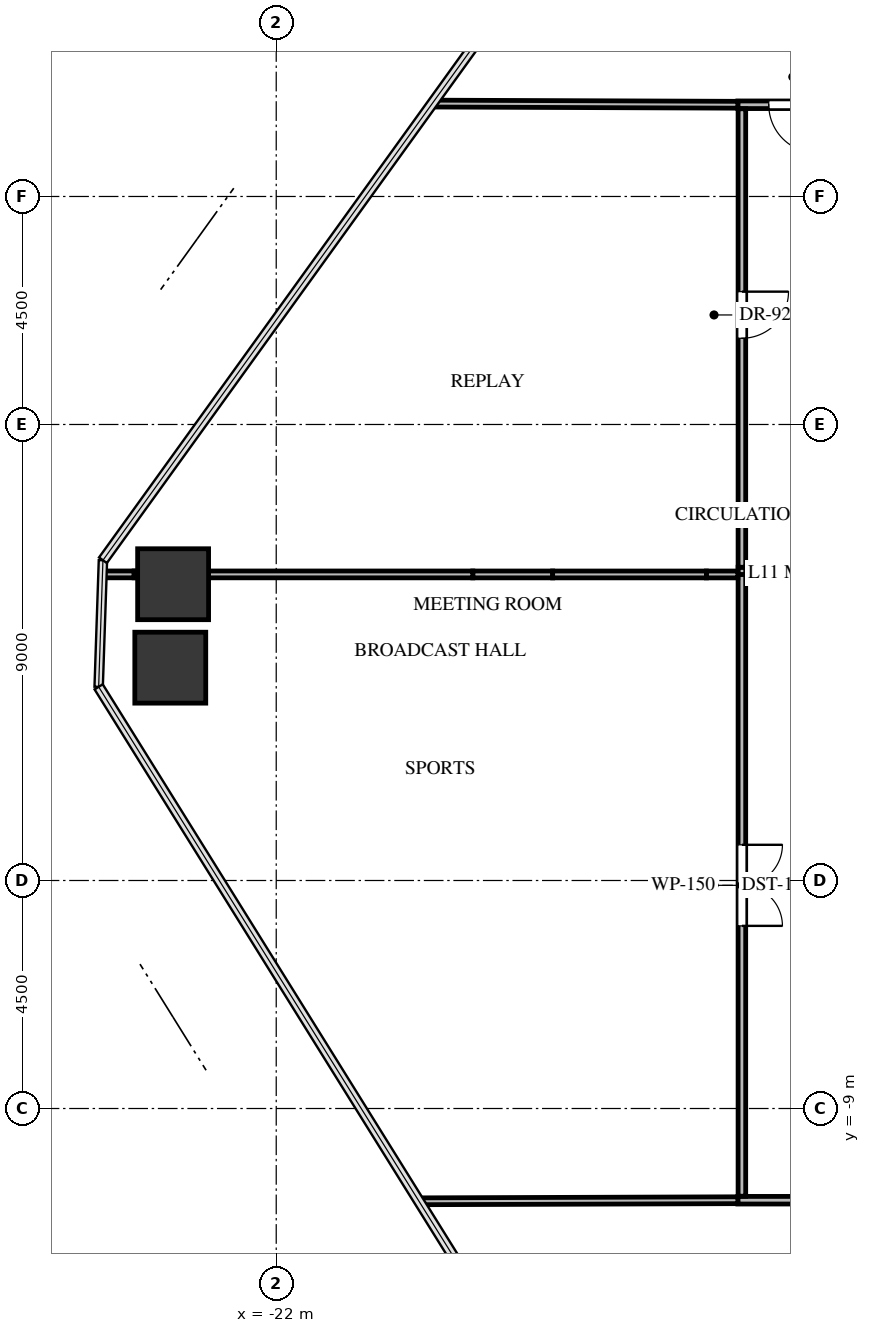
"""IFC4 building model, lengths in metres.
Left out: names, types, materials, properties, quantities, classifications, styles, units other than length and angle.
Written with IfcOpenShell. Run it as: python <this file> out.ifc"""

import sys

from ifc_helpers import new_model, si_unit, direction, frame, frame_2d, origin, origin_2d, place, context, subcontext, project, spatial, rectangle, extrude, source, transform, mapped, element, fill, save


model = new_model("IFC4")
c1 = context("Model", 3, precision=1e-05, world=origin(), true_north=direction((0.0, 1.0)))
c2 = subcontext(c1, "Body", "Model", "MODEL_VIEW")
j1 = project(units=[si_unit("LENGTHUNIT", "METRE"), si_unit("PLANEANGLEUNIT", "RADIAN")], contexts=[c1])
p1 = place(None, origin())
s1 = spatial("IfcSite", under=j1, at=p1, CompositionType="ELEMENT")
p2 = place(p1, origin())
s2 = spatial("IfcBuilding", under=s1, at=p2, CompositionType="ELEMENT")
p3 = place(p2, frame((0.0, 0.0, 48.9)))
s3 = spatial("IfcBuildingStorey", under=s2, at=p3, CompositionType="ELEMENT", Elevation=48.9)
m1 = source(origin(), c2, "Body", "SweptSolid", [
    extrude(rectangle(XDim=1.4, YDim=1.4, at=origin_2d()), origin(), (0.0, 0.0, 1.0), 3.3),
])
for number, where, z_axis, x_axis in (
    (1, (-24.091, -0.3, -0.24), (0.0, 0.0, 1.0), (1.0, 0.0, 0.0)),
    (2, (-24.035, 1.347, -0.24), (0.0, 0.0, 1.0), (1.0, 0.0, 0.0)),
):
    element("IfcColumn", number, at=place(p3, frame(where, z_axis=z_axis, x_axis=x_axis)), inside=s3, PredefinedType="COLUMN", context=c2, shape_type="MappedRepresentation", body=[
        mapped(m1, transform((0.0, 0.0, 0.0), x_axis=(1.0, 0.0, 0.0), y_axis=(0.0, 1.0, 0.0), z_axis=(0.0, 0.0, 1.0), scale=1.0)),
    ])
p4 = place(p3, frame((-10.72, 10.81, 0.0), z_axis=(0.0, 0.0, 1.0), x_axis=(-1.0, 0.0, 0.0)))
e3 = element("IfcWall", 3, at=p4, inside=s3, PredefinedType="PARTITIONING", context=c2, shape_type="SweptSolid", body=[
    extrude(rectangle(XDim=2.17, YDim=0.15, at=frame_2d((1.085, 0.0))), origin(), (0.0, 0.0, 1.0), 3.045),
])
p5 = place(p4, frame((0.61, 0.0, 0.0)))
e4 = element("IfcOpeningElement", 4, at=p5, cuts=e3, PredefinedType="OPENING", context=c2, shape_type="SweptSolid", body=[
    extrude(rectangle(XDim=0.95, YDim=2.1, at=frame_2d((0.475, 1.05))), frame((0.0, 0.085, 0.0), z_axis=(0.0, -1.0, 0.0), x_axis=(1.0, 0.0, 0.0)), (0.0, 0.0, 1.0), 0.17),
])
p6 = place(p3, frame((-12.89, -10.81, 0.0), z_axis=(0.0, 0.0, 1.0), x_axis=(1.0, 0.0, 0.0)))
e5 = element("IfcWall", 5, at=p6, inside=s3, PredefinedType="PARTITIONING", context=c2, shape_type="SweptSolid", body=[
    extrude(rectangle(XDim=5.43, YDim=0.15, at=frame_2d((2.715, 0.0))), origin(), (0.0, 0.0, 1.0), 3.045),
])
p7 = place(p6, frame((2.24, 0.0, 0.0)))
e6 = element("IfcOpeningElement", 6, at=p7, cuts=e5, PredefinedType="OPENING", context=c2, shape_type="SweptSolid", body=[
    extrude(rectangle(XDim=0.95, YDim=2.1, at=frame_2d((0.475, 1.05))), frame((0.0, 0.085, 0.0), z_axis=(0.0, -1.0, 0.0), x_axis=(1.0, 0.0, 0.0)), (0.0, 0.0, 1.0), 0.17),
])
p8 = place(p3, frame((-12.81, 1.54, 0.0), z_axis=(0.0, 0.0, 1.0), x_axis=(0.0, -1.0, 0.0)))
e7 = element("IfcWall", 7, at=p8, inside=s3, PredefinedType="PARTITIONING", context=c2, shape_type="SweptSolid", body=[
    extrude(rectangle(XDim=12.271, YDim=0.15, at=frame_2d((6.135, 0.0))), origin(), (0.0, 0.0, 1.0), 3.045),
])
p9 = place(p8, frame((5.335, 0.0, 0.0)))
e8 = element("IfcOpeningElement", 8, at=p9, cuts=e7, PredefinedType="OPENING", context=c2, shape_type="SweptSolid", body=[
    extrude(rectangle(XDim=1.6, YDim=2.15, at=frame_2d((0.8, 1.075))), frame((0.0, 0.085, 0.0), z_axis=(0.0, -1.0, 0.0), x_axis=(1.0, 0.0, 0.0)), (0.0, 0.0, 1.0), 0.17),
])
p10 = place(p3, frame((-12.81, 10.731, 0.0), z_axis=(0.0, 0.0, 1.0), x_axis=(0.0, -1.0, 0.0)))
e9 = element("IfcWall", 9, at=p10, inside=s3, PredefinedType="PARTITIONING", context=c2, shape_type="SweptSolid", body=[
    extrude(rectangle(XDim=8.139, YDim=0.15, at=frame_2d((4.069, 0.0))), origin(), (0.0, 0.0, 1.0), 3.045),
])
p11 = place(p10, frame((3.609, 0.0, 0.0)))
e10 = element("IfcOpeningElement", 10, at=p11, cuts=e9, PredefinedType="OPENING", context=c2, shape_type="SweptSolid", body=[
    extrude(rectangle(XDim=0.92, YDim=2.1, at=frame_2d((0.46, 1.05))), frame((0.0, 0.085, 0.0), z_axis=(0.0, -1.0, 0.0), x_axis=(1.0, 0.0, 0.0)), (0.0, 0.0, 1.0), 0.17),
])
p12 = place(p3, frame((-12.81, 1.682, 0.0), z_axis=(0.0, 0.0, 1.0), x_axis=(0.0, -1.0, 0.0)))
e11 = element("IfcWall", 11, at=p12, inside=s3, PredefinedType="PARTITIONING", context=c2, shape_type="SweptSolid", body=[
    extrude(rectangle(XDim=0.142, YDim=0.15, at=frame_2d((0.071, 0.0))), origin(), (0.0, 0.0, 1.0), 3.045),
])
p13 = place(p3, frame((-12.81, 2.592, 0.0), z_axis=(0.0, 0.0, 1.0), x_axis=(0.0, -1.0, 0.0)))
e12 = element("IfcWall", 12, at=p13, inside=s3, PredefinedType="PARTITIONING", context=c2, shape_type="SweptSolid", body=[
    extrude(rectangle(XDim=0.91, YDim=0.15, at=frame_2d((0.455, 0.0))), origin(), (0.0, 0.0, 1.0), 2.13),
])
p14 = place(p3, frame((-12.89, 10.81, 0.0), z_axis=(0.0, 0.0, 1.0), x_axis=(-0.999992607823, 0.003845035728, 0.0)))
e13 = element("IfcWall", 13, at=p14, inside=s3, PredefinedType="PARTITIONING", context=c2, shape_type="SweptSolid", body=[
    extrude(rectangle(XDim=6.032, YDim=0.135, at=frame_2d((3.016, 0.0))), origin(), (0.0, 0.0, 1.0), 2.38),
])
p15 = place(p3, frame((-19.182, -10.831, 0.0), z_axis=(0.0, 0.0, 1.0), x_axis=(0.999994432845, 0.003336806783, 0.0)))
e14 = element("IfcWall", 14, at=p15, inside=s3, PredefinedType="PARTITIONING", context=c2, shape_type="SweptSolid", body=[
    extrude(rectangle(XDim=6.292, YDim=0.135, at=frame_2d((3.146, 0.0))), origin(), (0.0, 0.0, 1.0), 2.38),
])
p16 = place(p3, frame((-25.429, 1.542, 0.0), z_axis=(0.0, 0.0, 1.0), x_axis=(0.999999923706, -0.00039062497, 0.0)))
e15 = element("IfcWall", 15, at=p16, inside=s3, PredefinedType="PARTITIONING", context=c2, shape_type="SweptSolid", body=[
    extrude(rectangle(XDim=0.625, YDim=0.135, at=frame_2d((0.312, 0.0))), origin(), (0.0, 0.0, 1.0), 1.877),
])
p17 = place(p3, frame((-18.121, 1.541, 0.0), z_axis=(0.0, 0.0, 1.0), x_axis=(0.999999988, -0.000154918666, 0.0)))
e16 = element("IfcWall", 16, at=p17, inside=s3, PredefinedType="PARTITIONING", context=c2, shape_type="SweptSolid", body=[
    extrude(rectangle(XDim=1.576, YDim=0.135, at=frame_2d((0.788, 0.0))), origin(), (0.0, 0.0, 1.0), 2.13),
])
p18 = place(p3, frame((-13.51, 1.54, 0.0), z_axis=(0.0, 0.0, 1.0), x_axis=(1.0, 0.0, 0.0)))
e17 = element("IfcWall", 17, at=p18, inside=s3, PredefinedType="PARTITIONING", context=c2, shape_type="SweptSolid", body=[
    extrude(rectangle(XDim=0.622, YDim=0.135, at=frame_2d((0.311, 0.0))), origin(), (0.0, 0.0, 1.0), 2.13),
])
p19 = place(p3, frame((-24.804, 1.541, 0.0), z_axis=(0.0, 0.0, 1.0), x_axis=(0.999999993996, -0.000109585037, 0.0)))
e18 = element("IfcWall", 18, at=p19, inside=s3, PredefinedType="PARTITIONING", context=c2, shape_type="SweptSolid", body=[
    extrude(rectangle(XDim=6.684, YDim=0.135, at=frame_2d((3.342, 0.0))), origin(), (0.0, 0.0, 1.0), 1.877),
])
p20 = place(p3, frame((-16.545, 1.54, 0.0), z_axis=(0.0, 0.0, 1.0), x_axis=(0.999999996763, -8.0463469e-05, 0.0)))
e19 = element("IfcWall", 19, at=p20, inside=s3, PredefinedType="PARTITIONING", context=c2, shape_type="SweptSolid", body=[
    extrude(rectangle(XDim=3.034, YDim=0.135, at=frame_2d((1.517, 0.0))), origin(), (0.0, 0.0, 1.0), 2.13),
])
m2 = source(origin(), c2, "Body", "SweptSolid", [
    extrude(rectangle(XDim=0.95, YDim=2.1, at=frame_2d((0.475, 1.05))), frame((0.0, 0.025, 0.0), z_axis=(0.0, -1.0, 0.0), x_axis=(1.0, 0.0, 0.0)), (0.0, 0.0, 1.0), 0.05),
])
p21 = place(p5, origin())
e20 = element("IfcDoor", 20, at=p21, inside=s3, OperationType="SINGLE_SWING_LEFT", PredefinedType="DOOR", context=c2, shape_type="MappedRepresentation", body=[
    mapped(m2, transform((0.0, 0.0, 0.0), x_axis=(1.0, 0.0, 0.0), y_axis=(0.0, 1.0, 0.0), z_axis=(0.0, 0.0, 1.0), scale=1.0)),
])
fill(e4, e20)
m3 = source(origin(), c2, "Body", "SweptSolid", [
    extrude(rectangle(XDim=1.6, YDim=2.15, at=frame_2d((0.8, 1.075))), frame((0.0, 0.025, 0.0), z_axis=(0.0, -1.0, 0.0), x_axis=(1.0, 0.0, 0.0)), (0.0, 0.0, 1.0), 0.05),
])
p22 = place(p9, origin())
e21 = element("IfcDoor", 21, at=p22, inside=s3, OperationType="DOUBLE_DOOR_SINGLE_SWING", PredefinedType="DOOR", context=c2, shape_type="MappedRepresentation", body=[
    mapped(m3, transform((0.0, 0.0, 0.0), x_axis=(1.0, 0.0, 0.0), y_axis=(0.0, 1.0, 0.0), z_axis=(0.0, 0.0, 1.0), scale=1.0)),
])
fill(e8, e21)
m4 = source(origin(), c2, "Body", "SweptSolid", [
    extrude(rectangle(XDim=0.92, YDim=2.1, at=frame_2d((0.46, 1.05))), frame((0.0, 0.025, 0.0), z_axis=(0.0, -1.0, 0.0), x_axis=(1.0, 0.0, 0.0)), (0.0, 0.0, 1.0), 0.05),
])
p23 = place(p11, origin())
e22 = element("IfcDoor", 22, at=p23, inside=s3, OperationType="SINGLE_SWING_LEFT", PredefinedType="DOOR", context=c2, shape_type="MappedRepresentation", body=[
    mapped(m4, transform((0.0, 0.0, 0.0), x_axis=(1.0, 0.0, 0.0), y_axis=(0.0, 1.0, 0.0), z_axis=(0.0, 0.0, 1.0), scale=1.0)),
])
fill(e10, e22)
save(model, sys.argv[1])
